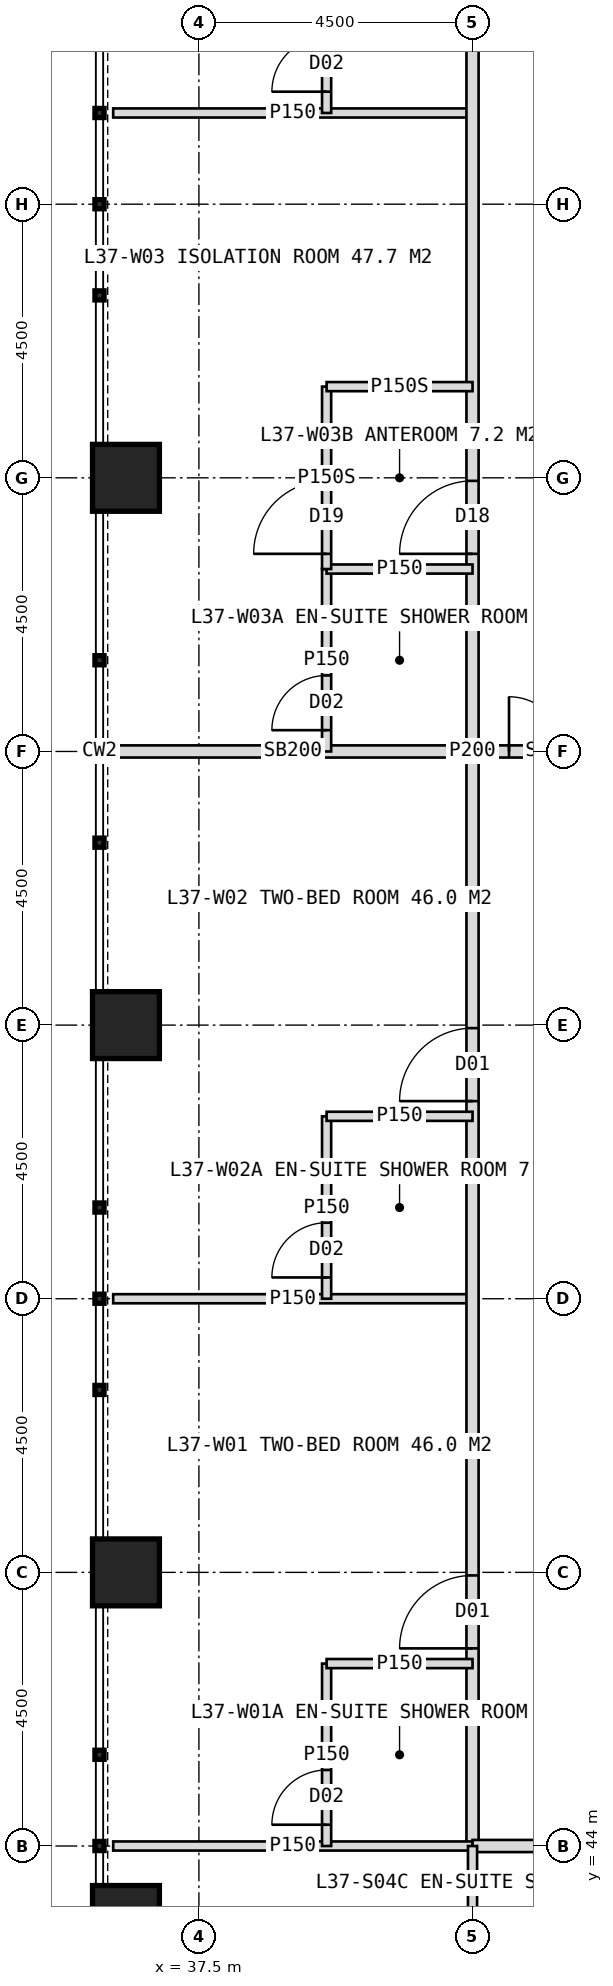
"""IFC4 building model, lengths in metres.
Left out: names, types, materials, properties, quantities, classifications, styles, units other than length and angle.
Written with IfcOpenShell. Run it as: python <this file> out.ifc"""

import sys

from ifc_helpers import new_model, si_unit, direction, frame, frame_2d, origin, origin_2d, place, context, subcontext, project, spatial, rectangle, hollow_rectangle, extrude, element, fill, save


model = new_model("IFC4")
c1 = context("Model", 3, precision=1e-05, world=origin(), true_north=direction((0.0, 1.0)))
c2 = subcontext(c1, "Body", "Model", "MODEL_VIEW")
j1 = project(units=[si_unit("LENGTHUNIT", "METRE"), si_unit("PLANEANGLEUNIT", "RADIAN")], contexts=[c1])
p1 = place(None, origin())
s1 = spatial("IfcSite", under=j1, at=p1, CompositionType="ELEMENT")
p2 = place(p1, origin())
s2 = spatial("IfcBuilding", under=s1, at=p2, CompositionType="ELEMENT")
p3 = place(p2, frame((0.0, 0.0, 156.0)))
s3 = spatial("IfcBuildingStorey", under=s2, at=p3, CompositionType="ELEMENT", Elevation=156.0)
for number, where, z_axis, x_axis in (
    (1, (36.3, 42.8, 0.0), (0.0, 0.0, 1.0), (1.0, 0.0, 0.0)),
    (2, (36.3, 48.5, 0.0), (0.0, 0.0, 1.0), (1.0, 0.0, 0.0)),
    (3, (36.3, 57.5, 0.0), (0.0, 0.0, 1.0), (1.0, 0.0, 0.0)),
    (4, (36.3, 66.5, 0.0), (0.0, 0.0, 1.0), (1.0, 0.0, 0.0)),
):
    element("IfcColumn", number, at=place(p3, frame(where, z_axis=z_axis, x_axis=x_axis)), inside=s3, PredefinedType="COLUMN", context=c2, shape_type="SweptSolid", body=[
        extrude(hollow_rectangle(XDim=1.1, YDim=1.1, WallThickness=0.1, at=origin_2d()), origin(), (0.0, 0.0, 1.0), 4.0),
    ])
p4 = place(p3, frame((42.0, 53.0, 0.0), z_axis=(0.0, 0.0, 1.0), x_axis=(-1.0, 0.0, 0.0)))
e5 = element("IfcWall", 5, at=p4, inside=s3, PredefinedType="PARTITIONING", context=c2, shape_type="SweptSolid", body=[
    extrude(rectangle(XDim=5.91, YDim=0.15, at=frame_2d((2.955, 0.0))), origin(), (0.0, 0.0, 1.0), 3.75),
])
p5 = place(p3, frame((42.0, 62.0, 0.0), z_axis=(0.0, 0.0, 1.0), x_axis=(-1.0, 0.0, 0.0)))
e6 = element("IfcWall", 6, at=p5, inside=s3, PredefinedType="SOLIDWALL", context=c2, shape_type="SweptSolid", body=[
    extrude(rectangle(XDim=5.91, YDim=0.2, at=frame_2d((2.955, 0.0))), origin(), (0.0, 0.0, 1.0), 2.95),
])
p6 = place(p3, frame((42.0, 72.5, 0.0), z_axis=(0.0, 0.0, 1.0), x_axis=(-1.0, 0.0, 0.0)))
e7 = element("IfcWall", 7, at=p6, inside=s3, PredefinedType="PARTITIONING", context=c2, shape_type="SweptSolid", body=[
    extrude(rectangle(XDim=5.91, YDim=0.15, at=frame_2d((2.955, 0.0))), origin(), (0.0, 0.0, 1.0), 3.75),
])
p7 = place(p3, frame((42.0, 44.0, 0.0), z_axis=(0.0, 0.0, 1.0), x_axis=(0.0, 1.0, 0.0)))
e8 = element("IfcWall", 8, at=p7, inside=s3, PredefinedType="PARTITIONING", context=c2, shape_type="SweptSolid", body=[
    extrude(rectangle(XDim=36.0, YDim=0.2, at=frame_2d((18.0, 0.0))), origin(), (0.0, 0.0, 1.0), 3.75),
])
p8 = place(p7, frame((3.25, 0.0, 0.0)))
e9 = element("IfcOpeningElement", 9, at=p8, cuts=e8, PredefinedType="OPENING", context=c2, shape_type="SweptSolid", body=[
    extrude(rectangle(XDim=1.2, YDim=2.2, at=frame_2d((0.6, 1.1))), frame((0.0, 0.11, 0.0), z_axis=(0.0, -1.0, 0.0), x_axis=(1.0, 0.0, 0.0)), (0.0, 0.0, 1.0), 0.22),
])
p9 = place(p7, frame((12.25, 0.0, 0.0)))
e10 = element("IfcOpeningElement", 10, at=p9, cuts=e8, PredefinedType="OPENING", context=c2, shape_type="SweptSolid", body=[
    extrude(rectangle(XDim=1.2, YDim=2.2, at=frame_2d((0.6, 1.1))), frame((0.0, 0.11, 0.0), z_axis=(0.0, -1.0, 0.0), x_axis=(1.0, 0.0, 0.0)), (0.0, 0.0, 1.0), 0.22),
])
p10 = place(p7, frame((21.25, 0.0, 0.0)))
e11 = element("IfcOpeningElement", 11, at=p10, cuts=e8, PredefinedType="OPENING", context=c2, shape_type="SweptSolid", body=[
    extrude(rectangle(XDim=1.2, YDim=2.2, at=frame_2d((0.6, 1.1))), frame((0.0, 0.11, 0.0), z_axis=(0.0, -1.0, 0.0), x_axis=(1.0, 0.0, 0.0)), (0.0, 0.0, 1.0), 0.22),
])
p11 = place(p7, frame((31.75, 0.0, 0.0)))
e12 = element("IfcOpeningElement", 12, at=p11, cuts=e8, PredefinedType="OPENING", context=c2, shape_type="SweptSolid", body=[
    extrude(rectangle(XDim=1.2, YDim=2.2, at=frame_2d((0.6, 1.1))), frame((0.0, 0.11, 0.0), z_axis=(0.0, -1.0, 0.0), x_axis=(1.0, 0.0, 0.0)), (0.0, 0.0, 1.0), 0.22),
])
p12 = place(p3, frame((42.0, 44.0, 0.0), z_axis=(0.0, 0.0, 1.0), x_axis=(-1.0, 0.0, 0.0)))
e13 = element("IfcWall", 13, at=p12, inside=s3, PredefinedType="PARTITIONING", context=c2, shape_type="SweptSolid", body=[
    extrude(rectangle(XDim=5.91, YDim=0.15, at=frame_2d((2.955, 0.0))), origin(), (0.0, 0.0, 1.0), 3.75),
])
p13 = place(p3, frame((39.6, 44.0, 0.0), z_axis=(0.0, 0.0, 1.0), x_axis=(0.0, 1.0, 0.0)))
e14 = element("IfcWall", 14, at=p13, inside=s3, PredefinedType="PARTITIONING", context=c2, shape_type="SweptSolid", body=[
    extrude(rectangle(XDim=3.0, YDim=0.15, at=frame_2d((1.5, 0.0))), origin(), (0.0, 0.0, 1.0), 3.75),
])
p14 = place(p13, frame((0.35, 0.0, 0.0)))
e15 = element("IfcOpeningElement", 15, at=p14, cuts=e14, PredefinedType="OPENING", context=c2, shape_type="SweptSolid", body=[
    extrude(rectangle(XDim=0.9, YDim=2.1, at=frame_2d((0.45, 1.05))), frame((0.0, 0.085, 0.0), z_axis=(0.0, -1.0, 0.0), x_axis=(1.0, 0.0, 0.0)), (0.0, 0.0, 1.0), 0.17),
])
p15 = place(p3, frame((42.0, 47.0, 0.0), z_axis=(0.0, 0.0, 1.0), x_axis=(-1.0, 0.0, 0.0)))
e16 = element("IfcWall", 16, at=p15, inside=s3, PredefinedType="PARTITIONING", context=c2, shape_type="SweptSolid", body=[
    extrude(rectangle(XDim=2.4, YDim=0.15, at=frame_2d((1.2, 0.0))), origin(), (0.0, 0.0, 1.0), 3.75),
])
p16 = place(p3, frame((39.6, 53.0, 0.0), z_axis=(0.0, 0.0, 1.0), x_axis=(0.0, 1.0, 0.0)))
e17 = element("IfcWall", 17, at=p16, inside=s3, PredefinedType="PARTITIONING", context=c2, shape_type="SweptSolid", body=[
    extrude(rectangle(XDim=3.0, YDim=0.15, at=frame_2d((1.5, 0.0))), origin(), (0.0, 0.0, 1.0), 3.75),
])
p17 = place(p16, frame((0.35, 0.0, 0.0)))
e18 = element("IfcOpeningElement", 18, at=p17, cuts=e17, PredefinedType="OPENING", context=c2, shape_type="SweptSolid", body=[
    extrude(rectangle(XDim=0.9, YDim=2.1, at=frame_2d((0.45, 1.05))), frame((0.0, 0.085, 0.0), z_axis=(0.0, -1.0, 0.0), x_axis=(1.0, 0.0, 0.0)), (0.0, 0.0, 1.0), 0.17),
])
p18 = place(p3, frame((42.0, 56.0, 0.0), z_axis=(0.0, 0.0, 1.0), x_axis=(-1.0, 0.0, 0.0)))
e19 = element("IfcWall", 19, at=p18, inside=s3, PredefinedType="PARTITIONING", context=c2, shape_type="SweptSolid", body=[
    extrude(rectangle(XDim=2.4, YDim=0.15, at=frame_2d((1.2, 0.0))), origin(), (0.0, 0.0, 1.0), 3.75),
])
p19 = place(p3, frame((39.6, 62.0, 0.0), z_axis=(0.0, 0.0, 1.0), x_axis=(0.0, 1.0, 0.0)))
e20 = element("IfcWall", 20, at=p19, inside=s3, PredefinedType="PARTITIONING", context=c2, shape_type="SweptSolid", body=[
    extrude(rectangle(XDim=3.0, YDim=0.15, at=frame_2d((1.5, 0.0))), origin(), (0.0, 0.0, 1.0), 3.75),
])
p20 = place(p19, frame((0.35, 0.0, 0.0)))
e21 = element("IfcOpeningElement", 21, at=p20, cuts=e20, PredefinedType="OPENING", context=c2, shape_type="SweptSolid", body=[
    extrude(rectangle(XDim=0.9, YDim=2.1, at=frame_2d((0.45, 1.05))), frame((0.0, 0.085, 0.0), z_axis=(0.0, -1.0, 0.0), x_axis=(1.0, 0.0, 0.0)), (0.0, 0.0, 1.0), 0.17),
])
p21 = place(p3, frame((42.0, 65.0, 0.0), z_axis=(0.0, 0.0, 1.0), x_axis=(-1.0, 0.0, 0.0)))
e22 = element("IfcWall", 22, at=p21, inside=s3, PredefinedType="PARTITIONING", context=c2, shape_type="SweptSolid", body=[
    extrude(rectangle(XDim=2.4, YDim=0.15, at=frame_2d((1.2, 0.0))), origin(), (0.0, 0.0, 1.0), 3.75),
])
p22 = place(p3, frame((39.6, 65.0, 0.0), z_axis=(0.0, 0.0, 1.0), x_axis=(0.0, 1.0, 0.0)))
e23 = element("IfcWall", 23, at=p22, inside=s3, PredefinedType="PARTITIONING", context=c2, shape_type="SweptSolid", body=[
    extrude(rectangle(XDim=3.0, YDim=0.15, at=frame_2d((1.5, 0.0))), origin(), (0.0, 0.0, 1.0), 3.75),
])
p23 = place(p22, frame((0.25, 0.0, 0.0)))
e24 = element("IfcOpeningElement", 24, at=p23, cuts=e23, PredefinedType="OPENING", context=c2, shape_type="SweptSolid", body=[
    extrude(rectangle(XDim=1.2, YDim=2.2, at=frame_2d((0.6, 1.1))), frame((0.0, 0.085, 0.0), z_axis=(0.0, -1.0, 0.0), x_axis=(1.0, 0.0, 0.0)), (0.0, 0.0, 1.0), 0.17),
])
p24 = place(p3, frame((42.0, 68.0, 0.0), z_axis=(0.0, 0.0, 1.0), x_axis=(-1.0, 0.0, 0.0)))
e25 = element("IfcWall", 25, at=p24, inside=s3, PredefinedType="PARTITIONING", context=c2, shape_type="SweptSolid", body=[
    extrude(rectangle(XDim=2.4, YDim=0.15, at=frame_2d((1.2, 0.0))), origin(), (0.0, 0.0, 1.0), 3.75),
])
p25 = place(p3, frame((39.6, 72.5, 0.0), z_axis=(0.0, 0.0, 1.0), x_axis=(0.0, 1.0, 0.0)))
e26 = element("IfcWall", 26, at=p25, inside=s3, PredefinedType="PARTITIONING", context=c2, shape_type="SweptSolid", body=[
    extrude(rectangle(XDim=3.0, YDim=0.15, at=frame_2d((1.5, 0.0))), origin(), (0.0, 0.0, 1.0), 3.75),
])
p26 = place(p25, frame((0.35, 0.0, 0.0)))
e27 = element("IfcOpeningElement", 27, at=p26, cuts=e26, PredefinedType="OPENING", context=c2, shape_type="SweptSolid", body=[
    extrude(rectangle(XDim=0.9, YDim=2.1, at=frame_2d((0.45, 1.05))), frame((0.0, 0.085, 0.0), z_axis=(0.0, -1.0, 0.0), x_axis=(1.0, 0.0, 0.0)), (0.0, 0.0, 1.0), 0.17),
])
p27 = place(p3, frame((78.0, 44.0, 0.0), z_axis=(0.0, 0.0, 1.0), x_axis=(-1.0, 0.0, 0.0)))
e28 = element("IfcWall", 28, at=p27, inside=s3, PredefinedType="PARTITIONING", context=c2, shape_type="SweptSolid", body=[
    extrude(rectangle(XDim=36.0, YDim=0.2, at=frame_2d((18.0, 0.0))), origin(), (0.0, 0.0, 1.0), 3.75),
])
p28 = place(p27, frame((3.25, 0.0, 0.0)))
e29 = element("IfcOpeningElement", 29, at=p28, cuts=e28, PredefinedType="OPENING", context=c2, shape_type="SweptSolid", body=[
    extrude(rectangle(XDim=1.2, YDim=2.2, at=frame_2d((0.6, 1.1))), frame((0.0, 0.11, 0.0), z_axis=(0.0, -1.0, 0.0), x_axis=(1.0, 0.0, 0.0)), (0.0, 0.0, 1.0), 0.22),
])
p29 = place(p27, frame((12.25, 0.0, 0.0)))
e30 = element("IfcOpeningElement", 30, at=p29, cuts=e28, PredefinedType="OPENING", context=c2, shape_type="SweptSolid", body=[
    extrude(rectangle(XDim=1.2, YDim=2.2, at=frame_2d((0.6, 1.1))), frame((0.0, 0.11, 0.0), z_axis=(0.0, -1.0, 0.0), x_axis=(1.0, 0.0, 0.0)), (0.0, 0.0, 1.0), 0.22),
])
p30 = place(p27, frame((21.25, 0.0, 0.0)))
e31 = element("IfcOpeningElement", 31, at=p30, cuts=e28, PredefinedType="OPENING", context=c2, shape_type="SweptSolid", body=[
    extrude(rectangle(XDim=1.2, YDim=2.2, at=frame_2d((0.6, 1.1))), frame((0.0, 0.11, 0.0), z_axis=(0.0, -1.0, 0.0), x_axis=(1.0, 0.0, 0.0)), (0.0, 0.0, 1.0), 0.22),
])
p31 = place(p27, frame((29.65, 0.0, 0.0)))
e32 = element("IfcOpeningElement", 32, at=p31, cuts=e28, PredefinedType="OPENING", context=c2, shape_type="SweptSolid", body=[
    extrude(rectangle(XDim=1.2, YDim=2.2, at=frame_2d((0.6, 1.1))), frame((0.0, 0.11, 0.0), z_axis=(0.0, -1.0, 0.0), x_axis=(1.0, 0.0, 0.0)), (0.0, 0.0, 1.0), 0.22),
])
p32 = place(p3, frame((42.0, 44.0, 0.0), z_axis=(0.0, 0.0, 1.0), x_axis=(0.0, -1.0, 0.0)))
e33 = element("IfcWall", 33, at=p32, inside=s3, PredefinedType="PARTITIONING", context=c2, shape_type="SweptSolid", body=[
    extrude(rectangle(XDim=2.4, YDim=0.15, at=frame_2d((1.2, 0.0))), origin(), (0.0, 0.0, 1.0), 3.75),
])
p33 = place(p3, frame((44.7, 62.0, 0.0), z_axis=(0.0, 0.0, 1.0), x_axis=(-1.0, 0.0, 0.0)))
e34 = element("IfcWall", 34, at=p33, inside=s3, PredefinedType="SOLIDWALL", context=c2, shape_type="SweptSolid", body=[
    extrude(rectangle(XDim=2.7, YDim=0.2, at=frame_2d((1.35, 0.0))), origin(), (0.0, 0.0, 1.0), 2.95),
])
p34 = place(p33, frame((0.3, 0.0, 0.0)))
e35 = element("IfcOpeningElement", 35, at=p34, cuts=e34, PredefinedType="OPENING", context=c2, shape_type="SweptSolid", body=[
    extrude(rectangle(XDim=1.8, YDim=2.2, at=frame_2d((0.9, 1.1))), frame((0.0, 0.11, 0.0), z_axis=(0.0, -1.0, 0.0), x_axis=(1.0, 0.0, 0.0)), (0.0, 0.0, 1.0), 0.22),
])
p35 = place(p8, origin())
e36 = element("IfcDoor", 36, at=p35, inside=s3, OperationType="SINGLE_SWING_LEFT", PredefinedType="DOOR", context=c2, shape_type="SweptSolid", body=[
    extrude(rectangle(XDim=1.2, YDim=2.2, at=frame_2d((0.6, 1.1))), frame((0.0, 0.025, 0.0), z_axis=(0.0, -1.0, 0.0), x_axis=(1.0, 0.0, 0.0)), (0.0, 0.0, 1.0), 0.05),
])
fill(e9, e36)
p36 = place(p14, origin())
e37 = element("IfcDoor", 37, at=p36, inside=s3, OperationType="SINGLE_SWING_LEFT", PredefinedType="DOOR", context=c2, shape_type="SweptSolid", body=[
    extrude(rectangle(XDim=0.9, YDim=2.1, at=frame_2d((0.45, 1.05))), frame((0.0, 0.025, 0.0), z_axis=(0.0, -1.0, 0.0), x_axis=(1.0, 0.0, 0.0)), (0.0, 0.0, 1.0), 0.05),
])
fill(e15, e37)
p37 = place(p9, origin())
e38 = element("IfcDoor", 38, at=p37, inside=s3, OperationType="SINGLE_SWING_LEFT", PredefinedType="DOOR", context=c2, shape_type="SweptSolid", body=[
    extrude(rectangle(XDim=1.2, YDim=2.2, at=frame_2d((0.6, 1.1))), frame((0.0, 0.025, 0.0), z_axis=(0.0, -1.0, 0.0), x_axis=(1.0, 0.0, 0.0)), (0.0, 0.0, 1.0), 0.05),
])
fill(e10, e38)
p38 = place(p17, origin())
e39 = element("IfcDoor", 39, at=p38, inside=s3, OperationType="SINGLE_SWING_LEFT", PredefinedType="DOOR", context=c2, shape_type="SweptSolid", body=[
    extrude(rectangle(XDim=0.9, YDim=2.1, at=frame_2d((0.45, 1.05))), frame((0.0, 0.025, 0.0), z_axis=(0.0, -1.0, 0.0), x_axis=(1.0, 0.0, 0.0)), (0.0, 0.0, 1.0), 0.05),
])
fill(e18, e39)
p39 = place(p23, origin())
e40 = element("IfcDoor", 40, at=p39, inside=s3, OperationType="SINGLE_SWING_LEFT", PredefinedType="DOOR", context=c2, shape_type="SweptSolid", body=[
    extrude(rectangle(XDim=1.2, YDim=2.2, at=frame_2d((0.6, 1.1))), frame((0.0, 0.025, 0.0), z_axis=(0.0, -1.0, 0.0), x_axis=(1.0, 0.0, 0.0)), (0.0, 0.0, 1.0), 0.05),
])
fill(e24, e40)
p40 = place(p10, origin())
e41 = element("IfcDoor", 41, at=p40, inside=s3, OperationType="SINGLE_SWING_LEFT", PredefinedType="DOOR", context=c2, shape_type="SweptSolid", body=[
    extrude(rectangle(XDim=1.2, YDim=2.2, at=frame_2d((0.6, 1.1))), frame((0.0, 0.025, 0.0), z_axis=(0.0, -1.0, 0.0), x_axis=(1.0, 0.0, 0.0)), (0.0, 0.0, 1.0), 0.05),
])
fill(e11, e41)
p41 = place(p20, origin())
e42 = element("IfcDoor", 42, at=p41, inside=s3, OperationType="SINGLE_SWING_LEFT", PredefinedType="DOOR", context=c2, shape_type="SweptSolid", body=[
    extrude(rectangle(XDim=0.9, YDim=2.1, at=frame_2d((0.45, 1.05))), frame((0.0, 0.025, 0.0), z_axis=(0.0, -1.0, 0.0), x_axis=(1.0, 0.0, 0.0)), (0.0, 0.0, 1.0), 0.05),
])
fill(e21, e42)
p42 = place(p26, origin())
e43 = element("IfcDoor", 43, at=p42, inside=s3, OperationType="SINGLE_SWING_LEFT", PredefinedType="DOOR", context=c2, shape_type="SweptSolid", body=[
    extrude(rectangle(XDim=0.9, YDim=2.1, at=frame_2d((0.45, 1.05))), frame((0.0, 0.025, 0.0), z_axis=(0.0, -1.0, 0.0), x_axis=(1.0, 0.0, 0.0)), (0.0, 0.0, 1.0), 0.05),
])
fill(e27, e43)
p43 = place(p34, origin())
e44 = element("IfcDoor", 44, at=p43, inside=s3, OperationType="DOUBLE_DOOR_DOUBLE_SWING", PredefinedType="DOOR", context=c2, shape_type="SweptSolid", body=[
    extrude(rectangle(XDim=1.8, YDim=2.2, at=frame_2d((0.9, 1.1))), frame((0.0, 0.025, 0.0), z_axis=(0.0, -1.0, 0.0), x_axis=(1.0, 0.0, 0.0)), (0.0, 0.0, 1.0), 0.05),
])
fill(e35, e44)
save(model, sys.argv[1])
